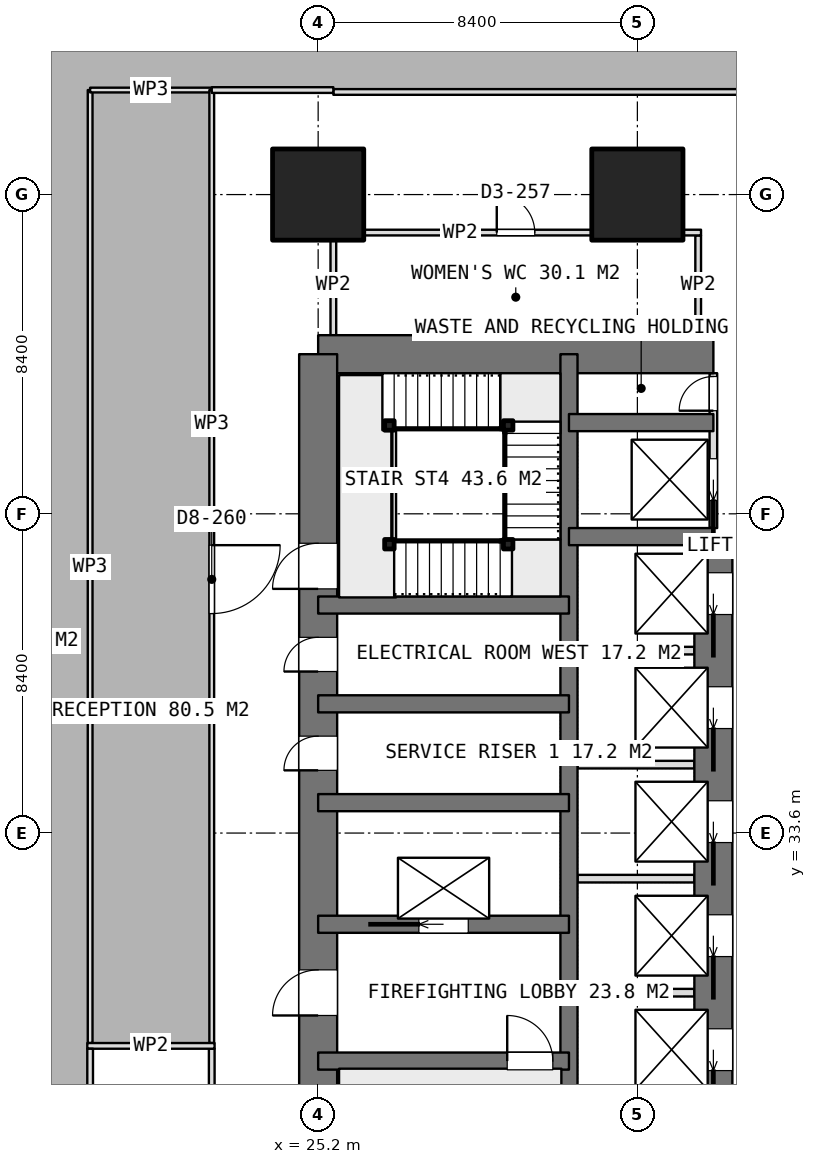
"""IFC4 building model, lengths in metres.
Left out: names, types, materials, properties, quantities, classifications, styles, units other than length and angle.
Written with IfcOpenShell. Run it as: python <this file> out.ifc"""

import sys

from ifc_helpers import new_model, si_unit, direction, frame, frame_2d, origin, origin_2d, place, context, subcontext, project, spatial, rectangle, extrude, element, fill, save


model = new_model("IFC4")
c1 = context("Model", 3, precision=1e-05, world=origin(), true_north=direction((0.0, 1.0)))
c2 = subcontext(c1, "Body", "Model", "MODEL_VIEW")
j1 = project(units=[si_unit("LENGTHUNIT", "METRE"), si_unit("PLANEANGLEUNIT", "RADIAN")], contexts=[c1])
p1 = place(None, origin())
s1 = spatial("IfcSite", under=j1, at=p1, CompositionType="ELEMENT")
p2 = place(p1, origin())
s2 = spatial("IfcBuilding", under=s1, at=p2, CompositionType="ELEMENT")
p3 = place(p2, frame((0.0, 0.0, 236.45)))
s3 = spatial("IfcBuildingStorey", under=s2, at=p3, CompositionType="ELEMENT", Elevation=236.45)
p4 = place(p3, frame((25.2, 46.2, 0.0), z_axis=(0.0, 0.0, 1.0), x_axis=(1.0, 0.0, 0.0)))
e1 = element("IfcWall", 1, at=p4, inside=s3, PredefinedType="SHEAR", context=c2, shape_type="SweptSolid", body=[
    extrude(rectangle(XDim=10.4, YDim=1.0, at=frame_2d((5.2, 0.0))), origin(), (0.0, 0.0, 1.0), 3.75),
])
p5 = place(p3, frame((25.2, 21.0, 0.0), z_axis=(0.0, 0.0, 1.0), x_axis=(0.0, 1.0, 0.0)))
e2 = element("IfcWall", 2, at=p5, inside=s3, PredefinedType="SHEAR", context=c2, shape_type="SweptSolid", body=[
    extrude(rectangle(XDim=25.2, YDim=1.0, at=frame_2d((12.6, 0.0))), origin(), (0.0, 0.0, 1.0), 3.75),
])
p6 = place(p5, frame((7.8, 0.0, 0.0)))
e3 = element("IfcOpeningElement", 3, at=p6, cuts=e2, PredefinedType="OPENING", context=c2, shape_type="SweptSolid", body=[
    extrude(rectangle(XDim=1.2, YDim=2.1, at=frame_2d((0.6, 1.05))), frame((0.0, 0.51, 0.0), z_axis=(0.0, -1.0, 0.0), x_axis=(1.0, 0.0, 0.0)), (0.0, 0.0, 1.0), 1.02),
])
p7 = place(p5, frame((14.25, 0.0, 0.0)))
e4 = element("IfcOpeningElement", 4, at=p7, cuts=e2, PredefinedType="OPENING", context=c2, shape_type="SweptSolid", body=[
    extrude(rectangle(XDim=0.9, YDim=2.1, at=frame_2d((0.45, 1.05))), frame((0.0, 0.51, 0.0), z_axis=(0.0, -1.0, 0.0), x_axis=(1.0, 0.0, 0.0)), (0.0, 0.0, 1.0), 1.02),
])
p8 = place(p5, frame((16.85, 0.0, 0.0)))
e5 = element("IfcOpeningElement", 5, at=p8, cuts=e2, PredefinedType="OPENING", context=c2, shape_type="SweptSolid", body=[
    extrude(rectangle(XDim=0.9, YDim=2.1, at=frame_2d((0.45, 1.05))), frame((0.0, 0.51, 0.0), z_axis=(0.0, -1.0, 0.0), x_axis=(1.0, 0.0, 0.0)), (0.0, 0.0, 1.0), 1.02),
])
p9 = place(p5, frame((19.025, 0.0, 0.0)))
e6 = element("IfcOpeningElement", 6, at=p9, cuts=e2, PredefinedType="OPENING", context=c2, shape_type="SweptSolid", body=[
    extrude(rectangle(XDim=1.2, YDim=2.1, at=frame_2d((0.6, 1.05))), frame((0.0, 0.51, 0.0), z_axis=(0.0, -1.0, 0.0), x_axis=(1.0, 0.0, 0.0)), (0.0, 0.0, 1.0), 1.02),
])
p10 = place(p3, frame((31.8, 21.0, 0.0), z_axis=(0.0, 0.0, 1.0), x_axis=(0.0, 1.0, 0.0)))
e7 = element("IfcWall", 7, at=p10, inside=s3, PredefinedType="SHEAR", context=c2, shape_type="SweptSolid", body=[
    extrude(rectangle(XDim=25.2, YDim=0.45, at=frame_2d((12.6, 0.0))), origin(), (0.0, 0.0, 1.0), 3.75),
])
p11 = place(p3, frame((35.6, 23.4, 0.0), z_axis=(0.0, 0.0, 1.0), x_axis=(0.0, 1.0, 0.0)))
e8 = element("IfcWall", 8, at=p11, inside=s3, PredefinedType="SHEAR", context=c2, shape_type="SweptSolid", body=[
    extrude(rectangle(XDim=18.0, YDim=1.0, at=frame_2d((9.0, 0.0))), origin(), (0.0, 0.0, 1.0), 3.75),
])
p12 = place(p11, frame((0.95, 0.0, 0.0)))
e9 = element("IfcOpeningElement", 9, at=p12, cuts=e8, PredefinedType="OPENING", context=c2, shape_type="SweptSolid", body=[
    extrude(rectangle(XDim=1.1, YDim=2.1, at=frame_2d((0.55, 1.05))), frame((0.0, 0.51, 0.0), z_axis=(0.0, -1.0, 0.0), x_axis=(1.0, 0.0, 0.0)), (0.0, 0.0, 1.0), 1.02),
])
p13 = place(p11, frame((3.95, 0.0, 0.0)))
e10 = element("IfcOpeningElement", 10, at=p13, cuts=e8, PredefinedType="OPENING", context=c2, shape_type="SweptSolid", body=[
    extrude(rectangle(XDim=1.1, YDim=2.1, at=frame_2d((0.55, 1.05))), frame((0.0, 0.51, 0.0), z_axis=(0.0, -1.0, 0.0), x_axis=(1.0, 0.0, 0.0)), (0.0, 0.0, 1.0), 1.02),
])
p14 = place(p11, frame((6.95, 0.0, 0.0)))
e11 = element("IfcOpeningElement", 11, at=p14, cuts=e8, PredefinedType="OPENING", context=c2, shape_type="SweptSolid", body=[
    extrude(rectangle(XDim=1.1, YDim=2.1, at=frame_2d((0.55, 1.05))), frame((0.0, 0.51, 0.0), z_axis=(0.0, -1.0, 0.0), x_axis=(1.0, 0.0, 0.0)), (0.0, 0.0, 1.0), 1.02),
])
p15 = place(p11, frame((9.95, 0.0, 0.0)))
e12 = element("IfcOpeningElement", 12, at=p15, cuts=e8, PredefinedType="OPENING", context=c2, shape_type="SweptSolid", body=[
    extrude(rectangle(XDim=1.1, YDim=2.1, at=frame_2d((0.55, 1.05))), frame((0.0, 0.51, 0.0), z_axis=(0.0, -1.0, 0.0), x_axis=(1.0, 0.0, 0.0)), (0.0, 0.0, 1.0), 1.02),
])
p16 = place(p11, frame((12.95, 0.0, 0.0)))
e13 = element("IfcOpeningElement", 13, at=p16, cuts=e8, PredefinedType="OPENING", context=c2, shape_type="SweptSolid", body=[
    extrude(rectangle(XDim=1.1, YDim=2.1, at=frame_2d((0.55, 1.05))), frame((0.0, 0.51, 0.0), z_axis=(0.0, -1.0, 0.0), x_axis=(1.0, 0.0, 0.0)), (0.0, 0.0, 1.0), 1.02),
])
p17 = place(p11, frame((15.95, 0.0, 0.0)))
e14 = element("IfcOpeningElement", 14, at=p17, cuts=e8, PredefinedType="OPENING", context=c2, shape_type="SweptSolid", body=[
    extrude(rectangle(XDim=1.1, YDim=2.1, at=frame_2d((0.55, 1.05))), frame((0.0, 0.51, 0.0), z_axis=(0.0, -1.0, 0.0), x_axis=(1.0, 0.0, 0.0)), (0.0, 0.0, 1.0), 1.02),
])
for number, where, z_axis, x_axis in (
    (15, (31.8, 41.4, 0.0), (0.0, 0.0, 1.0), (1.0, 0.0, 0.0)),
    (16, (31.8, 44.4, 0.0), (0.0, 0.0, 1.0), (1.0, 0.0, 0.0)),
):
    element("IfcWall", number, at=place(p3, frame(where, z_axis=z_axis, x_axis=x_axis)), inside=s3, PredefinedType="SHEAR", context=c2, shape_type="SweptSolid", body=[
        extrude(rectangle(XDim=3.8, YDim=0.45, at=frame_2d((1.9, 0.0))), origin(), (0.0, 0.0, 1.0), 3.75),
    ])
p18 = place(p3, frame((25.2, 27.6, 0.0), z_axis=(0.0, 0.0, 1.0), x_axis=(1.0, 0.0, 0.0)))
e17 = element("IfcWall", 17, at=p18, inside=s3, PredefinedType="SHEAR", context=c2, shape_type="SweptSolid", body=[
    extrude(rectangle(XDim=6.6, YDim=0.45, at=frame_2d((3.3, 0.0))), origin(), (0.0, 0.0, 1.0), 3.75),
])
p19 = place(p18, frame((4.975, 0.0, 0.0)))
e18 = element("IfcOpeningElement", 18, at=p19, cuts=e17, PredefinedType="OPENING", context=c2, shape_type="SweptSolid", body=[
    extrude(rectangle(XDim=1.2, YDim=2.1, at=frame_2d((0.6, 1.05))), frame((0.0, 0.235, 0.0), z_axis=(0.0, -1.0, 0.0), x_axis=(1.0, 0.0, 0.0)), (0.0, 0.0, 1.0), 0.47),
])
p20 = place(p3, frame((25.2, 31.2, 0.0), z_axis=(0.0, 0.0, 1.0), x_axis=(1.0, 0.0, 0.0)))
e19 = element("IfcWall", 19, at=p20, inside=s3, PredefinedType="SHEAR", context=c2, shape_type="SweptSolid", body=[
    extrude(rectangle(XDim=6.6, YDim=0.45, at=frame_2d((3.3, 0.0))), origin(), (0.0, 0.0, 1.0), 3.75),
])
p21 = place(p20, frame((2.65, 0.0, 0.0)))
e20 = element("IfcOpeningElement", 20, at=p21, cuts=e19, PredefinedType="OPENING", context=c2, shape_type="SweptSolid", body=[
    extrude(rectangle(XDim=1.3, YDim=2.1, at=frame_2d((0.65, 1.05))), frame((0.0, 0.235, 0.0), z_axis=(0.0, -1.0, 0.0), x_axis=(1.0, 0.0, 0.0)), (0.0, 0.0, 1.0), 0.47),
])
for number, where, z_axis, x_axis in (
    (21, (25.2, 34.4, 0.0), (0.0, 0.0, 1.0), (1.0, 0.0, 0.0)),
    (22, (25.2, 37.0, 0.0), (0.0, 0.0, 1.0), (1.0, 0.0, 0.0)),
    (23, (25.2, 39.6, 0.0), (0.0, 0.0, 1.0), (1.0, 0.0, 0.0)),
):
    element("IfcWall", number, at=place(p3, frame(where, z_axis=z_axis, x_axis=x_axis)), inside=s3, PredefinedType="SHEAR", context=c2, shape_type="SweptSolid", body=[
        extrude(rectangle(XDim=6.6, YDim=0.45, at=frame_2d((3.3, 0.0))), origin(), (0.0, 0.0, 1.0), 3.75),
    ])
for number, where, z_axis, x_axis in (
    (24, (25.2, 50.4, 0.0), (0.0, 0.0, 1.0), (1.0, 0.0, 0.0)),
    (25, (33.6, 50.4, 0.0), (0.0, 0.0, 1.0), (1.0, 0.0, 0.0)),
):
    element("IfcColumn", number, at=place(p3, frame(where, z_axis=z_axis, x_axis=x_axis)), inside=s3, PredefinedType="COLUMN", context=c2, shape_type="SweptSolid", body=[
        extrude(rectangle(XDim=2.4, YDim=2.4, at=origin_2d()), origin(), (0.0, 0.0, 1.0), 3.75),
    ])
for number, where, z_axis, x_axis in (
    (26, (32.025, 29.4, 0.0), (0.0, 0.0, 1.0), (1.0, 0.0, 0.0)),
    (27, (32.025, 32.4, 0.0), (0.0, 0.0, 1.0), (1.0, 0.0, 0.0)),
    (28, (32.025, 35.4, 0.0), (0.0, 0.0, 1.0), (1.0, 0.0, 0.0)),
    (29, (32.025, 38.4, 0.0), (0.0, 0.0, 1.0), (1.0, 0.0, 0.0)),
):
    element("IfcWall", number, at=place(p3, frame(where, z_axis=z_axis, x_axis=x_axis)), inside=s3, PredefinedType="PARTITIONING", context=c2, shape_type="SweptSolid", body=[
        extrude(rectangle(XDim=3.075, YDim=0.2, at=frame_2d((1.538, 0.0))), origin(), (0.0, 0.0, 1.0), 3.4),
    ])
p22 = place(p3, frame((35.6, 41.625, 0.0), z_axis=(0.0, 0.0, 1.0), x_axis=(0.0, 1.0, 0.0)))
e30 = element("IfcWall", 30, at=p22, inside=s3, PredefinedType="PARTITIONING", context=c2, shape_type="SweptSolid", body=[
    extrude(rectangle(XDim=4.075, YDim=0.2, at=frame_2d((2.038, 0.0))), origin(), (0.0, 0.0, 1.0), 3.4),
])
p23 = place(p22, frame((3.088, 0.0, 0.0)))
e31 = element("IfcOpeningElement", 31, at=p23, cuts=e30, PredefinedType="OPENING", context=c2, shape_type="SweptSolid", body=[
    extrude(rectangle(XDim=0.9, YDim=2.1, at=frame_2d((0.45, 1.05))), frame((0.0, 0.11, 0.0), z_axis=(0.0, -1.0, 0.0), x_axis=(1.0, 0.0, 0.0)), (0.0, 0.0, 1.0), 0.22),
])
p24 = place(p22, frame((0.725, 0.0, 0.0)))
e32 = element("IfcOpeningElement", 32, at=p24, cuts=e30, PredefinedType="OPENING", context=c2, shape_type="SweptSolid", body=[
    extrude(rectangle(XDim=1.1, YDim=2.1, at=frame_2d((0.55, 1.05))), frame((0.0, 0.11, 0.0), z_axis=(0.0, -1.0, 0.0), x_axis=(1.0, 0.0, 0.0)), (0.0, 0.0, 1.0), 0.22),
])
p25 = place(p3, frame((25.525, 49.4, 0.0), z_axis=(0.0, 0.0, 1.0), x_axis=(1.0, 0.0, 0.0)))
e33 = element("IfcWall", 33, at=p25, inside=s3, PredefinedType="PARTITIONING", context=c2, shape_type="SweptSolid", body=[
    extrude(rectangle(XDim=9.75, YDim=0.15, at=frame_2d((4.875, 0.0))), origin(), (0.0, 0.0, 1.0), 3.4),
])
p26 = place(p25, frame((4.375, 0.0, 0.0)))
e34 = element("IfcOpeningElement", 34, at=p26, cuts=e33, PredefinedType="OPENING", context=c2, shape_type="SweptSolid", body=[
    extrude(rectangle(XDim=1.0, YDim=2.1, at=frame_2d((0.5, 1.05))), frame((0.0, 0.085, 0.0), z_axis=(0.0, -1.0, 0.0), x_axis=(1.0, 0.0, 0.0)), (0.0, 0.0, 1.0), 0.17),
])
for number, where, z_axis, x_axis in (
    (35, (25.6, 46.7, 0.0), (0.0, 0.0, 1.0), (0.0, 1.0, 0.0)),
    (36, (35.2, 46.7, 0.0), (0.0, 0.0, 1.0), (0.0, 1.0, 0.0)),
):
    element("IfcWall", number, at=place(p3, frame(where, z_axis=z_axis, x_axis=x_axis)), inside=s3, PredefinedType="PARTITIONING", context=c2, shape_type="SweptSolid", body=[
        extrude(rectangle(XDim=2.625, YDim=0.15, at=frame_2d((1.312, 0.0))), origin(), (0.0, 0.0, 1.0), 3.4),
    ])
p27 = place(p3, frame((19.125, 28.0, 0.0), z_axis=(0.0, 0.0, 1.0), x_axis=(1.0, 0.0, 0.0)))
e37 = element("IfcWall", 37, at=p27, inside=s3, PredefinedType="PARTITIONING", context=c2, shape_type="SweptSolid", body=[
    extrude(rectangle(XDim=3.35, YDim=0.15, at=frame_2d((1.675, 0.0))), origin(), (0.0, 0.0, 1.0), 3.4),
])
p28 = place(p3, frame((19.2, 21.075, 0.0), z_axis=(0.0, 0.0, 1.0), x_axis=(0.0, 1.0, 0.0)))
e38 = element("IfcWall", 38, at=p28, inside=s3, PredefinedType="PARTITIONING", context=c2, shape_type="SweptSolid", body=[
    extrude(rectangle(XDim=6.85, YDim=0.15, at=frame_2d((3.425, 0.0))), origin(), (0.0, 0.0, 1.0), 3.4),
])
p29 = place(p3, frame((22.4, 21.075, 0.0), z_axis=(0.0, 0.0, 1.0), x_axis=(0.0, 1.0, 0.0)))
e39 = element("IfcWall", 39, at=p29, inside=s3, PredefinedType="PARTITIONING", context=c2, shape_type="SweptSolid", body=[
    extrude(rectangle(XDim=6.85, YDim=0.15, at=frame_2d((3.425, 0.0))), origin(), (0.0, 0.0, 1.0), 3.4),
])
p30 = place(p29, frame((1.325, 0.0, 0.0)))
e40 = element("IfcOpeningElement", 40, at=p30, cuts=e39, PredefinedType="OPENING", context=c2, shape_type="SweptSolid", body=[
    extrude(rectangle(XDim=1.0, YDim=2.1, at=frame_2d((0.5, 1.05))), frame((0.0, 0.085, 0.0), z_axis=(0.0, -1.0, 0.0), x_axis=(1.0, 0.0, 0.0)), (0.0, 0.0, 1.0), 0.17),
])
p31 = place(p3, frame((19.2, 28.075, 0.0), z_axis=(0.0, 0.0, 1.0), x_axis=(0.0, 1.0, 0.0)))
e41 = element("IfcWall", 41, at=p31, inside=s3, PredefinedType="PARTITIONING", context=c2, shape_type="SweptSolid", body=[
    extrude(rectangle(XDim=25.075, YDim=0.125, at=frame_2d((12.538, 0.0))), origin(), (0.0, 0.0, 1.0), 3.4),
])
p32 = place(p3, frame((19.2, 53.15, 0.0), z_axis=(0.0, 0.0, 1.0), x_axis=(1.0, 0.0, 0.0)))
e42 = element("IfcWall", 42, at=p32, inside=s3, PredefinedType="PARTITIONING", context=c2, shape_type="SweptSolid", body=[
    extrude(rectangle(XDim=3.2, YDim=0.125, at=frame_2d((1.6, 0.0))), origin(), (0.0, 0.0, 1.0), 3.4),
])
p33 = place(p3, frame((22.4, 53.15, 0.0), z_axis=(0.0, 0.0, 1.0), x_axis=(0.0, -1.0, 0.0)))
e43 = element("IfcWall", 43, at=p33, inside=s3, PredefinedType="PARTITIONING", context=c2, shape_type="SweptSolid", body=[
    extrude(rectangle(XDim=25.075, YDim=0.125, at=frame_2d((12.538, 0.0))), origin(), (0.0, 0.0, 1.0), 3.4),
])
p34 = place(p33, frame((11.975, 0.0, 0.0)))
e44 = element("IfcOpeningElement", 44, at=p34, cuts=e43, PredefinedType="OPENING", context=c2, shape_type="SweptSolid", body=[
    extrude(rectangle(XDim=1.8, YDim=2.1, at=frame_2d((0.9, 1.05))), frame((0.0, 0.073, 0.0), z_axis=(0.0, -1.0, 0.0), x_axis=(1.0, 0.0, 0.0)), (0.0, 0.0, 1.0), 0.145),
])
p35 = place(p3, frame((53.2, 53.1, 0.0), z_axis=(0.0, 0.0, 1.0), x_axis=(-1.0, 0.0, 0.0)))
e45 = element("IfcWall", 45, at=p35, inside=s3, PredefinedType="PARTITIONING", context=c2, shape_type="SweptSolid", body=[
    extrude(rectangle(XDim=27.6, YDim=0.15, at=frame_2d((13.8, 0.0))), origin(), (0.0, 0.0, 1.0), 3.4),
])
p36 = place(p35, frame((13.3, 0.0, 0.0)))
e46 = element("IfcOpeningElement", 46, at=p36, cuts=e45, PredefinedType="OPENING", context=c2, shape_type="SweptSolid", body=[
    extrude(rectangle(XDim=1.0, YDim=2.1, at=frame_2d((0.5, 1.05))), frame((0.0, 0.085, 0.0), z_axis=(0.0, -1.0, 0.0), x_axis=(1.0, 0.0, 0.0)), (0.0, 0.0, 1.0), 0.17),
])
p37 = place(p3, frame((25.6, 53.15, 0.0), z_axis=(0.0, 0.0, 1.0), x_axis=(-1.0, 0.0, 0.0)))
e47 = element("IfcWall", 47, at=p37, inside=s3, PredefinedType="PARTITIONING", context=c2, shape_type="SweptSolid", body=[
    extrude(rectangle(XDim=3.2, YDim=0.15, at=frame_2d((1.6, 0.0))), origin(), (0.0, 0.0, 1.0), 3.4),
])
for number, where, z_axis, x_axis in (
    (48, (27.075, 41.2, 0.0), (0.0, 0.0, 1.0), (1.0, 0.0, 0.0)),
    (49, (30.2, 41.2, 0.0), (0.0, 0.0, 1.0), (1.0, 0.0, 0.0)),
    (50, (30.2, 44.325, 0.0), (0.0, 0.0, 1.0), (1.0, 0.0, 0.0)),
    (51, (27.075, 44.325, 0.0), (0.0, 0.0, 1.0), (1.0, 0.0, 0.0)),
):
    element("IfcColumn", number, at=place(p3, frame(where, z_axis=z_axis, x_axis=x_axis)), inside=s3, PredefinedType="COLUMN", context=c2, shape_type="SweptSolid", body=[
        extrude(rectangle(XDim=0.25, YDim=0.25, at=origin_2d()), origin(), (0.0, 0.0, 1.0), 3.75),
    ])
p38 = place(p6, origin())
e52 = element("IfcDoor", 52, at=p38, inside=s3, OperationType="SINGLE_SWING_LEFT", PredefinedType="DOOR", context=c2, shape_type="SweptSolid", body=[
    extrude(rectangle(XDim=1.2, YDim=2.1, at=frame_2d((0.6, 1.05))), frame((0.0, 0.025, 0.0), z_axis=(0.0, -1.0, 0.0), x_axis=(1.0, 0.0, 0.0)), (0.0, 0.0, 1.0), 0.05),
])
fill(e3, e52)
p39 = place(p7, origin())
e53 = element("IfcDoor", 53, at=p39, inside=s3, OperationType="SINGLE_SWING_LEFT", PredefinedType="DOOR", context=c2, shape_type="SweptSolid", body=[
    extrude(rectangle(XDim=0.9, YDim=2.1, at=frame_2d((0.45, 1.05))), frame((0.0, 0.025, 0.0), z_axis=(0.0, -1.0, 0.0), x_axis=(1.0, 0.0, 0.0)), (0.0, 0.0, 1.0), 0.05),
])
fill(e4, e53)
p40 = place(p8, origin())
e54 = element("IfcDoor", 54, at=p40, inside=s3, OperationType="SINGLE_SWING_LEFT", PredefinedType="DOOR", context=c2, shape_type="SweptSolid", body=[
    extrude(rectangle(XDim=0.9, YDim=2.1, at=frame_2d((0.45, 1.05))), frame((0.0, 0.025, 0.0), z_axis=(0.0, -1.0, 0.0), x_axis=(1.0, 0.0, 0.0)), (0.0, 0.0, 1.0), 0.05),
])
fill(e5, e54)
p41 = place(p23, origin())
e55 = element("IfcDoor", 55, at=p41, inside=s3, OperationType="SINGLE_SWING_LEFT", PredefinedType="DOOR", context=c2, shape_type="SweptSolid", body=[
    extrude(rectangle(XDim=0.9, YDim=2.1, at=frame_2d((0.45, 1.05))), frame((0.0, 0.025, 0.0), z_axis=(0.0, -1.0, 0.0), x_axis=(1.0, 0.0, 0.0)), (0.0, 0.0, 1.0), 0.05),
])
fill(e31, e55)
p42 = place(p13, origin())
e56 = element("IfcDoor", 56, at=p42, inside=s3, OperationType="SLIDING_TO_LEFT", PredefinedType="USERDEFINED", context=c2, shape_type="SweptSolid", body=[
    extrude(rectangle(XDim=1.1, YDim=2.1, at=frame_2d((0.55, 1.05))), frame((0.0, 0.025, 0.0), z_axis=(0.0, -1.0, 0.0), x_axis=(1.0, 0.0, 0.0)), (0.0, 0.0, 1.0), 0.05),
])
fill(e10, e56)
p43 = place(p14, origin())
e57 = element("IfcDoor", 57, at=p43, inside=s3, OperationType="SLIDING_TO_LEFT", PredefinedType="USERDEFINED", context=c2, shape_type="SweptSolid", body=[
    extrude(rectangle(XDim=1.1, YDim=2.1, at=frame_2d((0.55, 1.05))), frame((0.0, 0.025, 0.0), z_axis=(0.0, -1.0, 0.0), x_axis=(1.0, 0.0, 0.0)), (0.0, 0.0, 1.0), 0.05),
])
fill(e11, e57)
p44 = place(p15, origin())
e58 = element("IfcDoor", 58, at=p44, inside=s3, OperationType="SLIDING_TO_LEFT", PredefinedType="USERDEFINED", context=c2, shape_type="SweptSolid", body=[
    extrude(rectangle(XDim=1.1, YDim=2.1, at=frame_2d((0.55, 1.05))), frame((0.0, 0.025, 0.0), z_axis=(0.0, -1.0, 0.0), x_axis=(1.0, 0.0, 0.0)), (0.0, 0.0, 1.0), 0.05),
])
fill(e12, e58)
p45 = place(p16, origin())
e59 = element("IfcDoor", 59, at=p45, inside=s3, OperationType="SLIDING_TO_LEFT", PredefinedType="USERDEFINED", context=c2, shape_type="SweptSolid", body=[
    extrude(rectangle(XDim=1.1, YDim=2.1, at=frame_2d((0.55, 1.05))), frame((0.0, 0.025, 0.0), z_axis=(0.0, -1.0, 0.0), x_axis=(1.0, 0.0, 0.0)), (0.0, 0.0, 1.0), 0.05),
])
fill(e13, e59)
p46 = place(p17, origin())
e60 = element("IfcDoor", 60, at=p46, inside=s3, OperationType="SLIDING_TO_LEFT", PredefinedType="USERDEFINED", context=c2, shape_type="SweptSolid", body=[
    extrude(rectangle(XDim=1.1, YDim=2.1, at=frame_2d((0.55, 1.05))), frame((0.0, 0.025, 0.0), z_axis=(0.0, -1.0, 0.0), x_axis=(1.0, 0.0, 0.0)), (0.0, 0.0, 1.0), 0.05),
])
fill(e14, e60)
p47 = place(p21, origin())
e61 = element("IfcDoor", 61, at=p47, inside=s3, OperationType="SLIDING_TO_LEFT", PredefinedType="USERDEFINED", context=c2, shape_type="SweptSolid", body=[
    extrude(rectangle(XDim=1.3, YDim=2.1, at=frame_2d((0.65, 1.05))), frame((0.0, 0.025, 0.0), z_axis=(0.0, -1.0, 0.0), x_axis=(1.0, 0.0, 0.0)), (0.0, 0.0, 1.0), 0.05),
])
fill(e20, e61)
p48 = place(p24, origin())
e62 = element("IfcDoor", 62, at=p48, inside=s3, OperationType="SLIDING_TO_LEFT", PredefinedType="USERDEFINED", context=c2, shape_type="SweptSolid", body=[
    extrude(rectangle(XDim=1.1, YDim=2.1, at=frame_2d((0.55, 1.05))), frame((0.0, 0.025, 0.0), z_axis=(0.0, -1.0, 0.0), x_axis=(1.0, 0.0, 0.0)), (0.0, 0.0, 1.0), 0.05),
])
fill(e32, e62)
p49 = place(p26, origin())
e63 = element("IfcDoor", 63, at=p49, inside=s3, OperationType="SINGLE_SWING_LEFT", PredefinedType="DOOR", context=c2, shape_type="SweptSolid", body=[
    extrude(rectangle(XDim=1.0, YDim=2.1, at=frame_2d((0.5, 1.05))), frame((0.0, 0.025, 0.0), z_axis=(0.0, -1.0, 0.0), x_axis=(1.0, 0.0, 0.0)), (0.0, 0.0, 1.0), 0.05),
])
fill(e34, e63)
p50 = place(p34, origin())
e64 = element("IfcDoor", 64, at=p50, inside=s3, OperationType="DOUBLE_DOOR_SINGLE_SWING", PredefinedType="DOOR", context=c2, shape_type="SweptSolid", body=[
    extrude(rectangle(XDim=1.8, YDim=2.1, at=frame_2d((0.9, 1.05))), frame((0.0, 0.025, 0.0), z_axis=(0.0, -1.0, 0.0), x_axis=(1.0, 0.0, 0.0)), (0.0, 0.0, 1.0), 0.05),
])
fill(e44, e64)
p51 = place(p19, origin())
e65 = element("IfcDoor", 65, at=p51, inside=s3, OperationType="SINGLE_SWING_RIGHT", PredefinedType="DOOR", context=c2, shape_type="SweptSolid", body=[
    extrude(rectangle(XDim=1.2, YDim=2.1, at=frame_2d((0.6, 1.05))), frame((0.0, 0.025, 0.0), z_axis=(0.0, -1.0, 0.0), x_axis=(1.0, 0.0, 0.0)), (0.0, 0.0, 1.0), 0.05),
])
fill(e18, e65)
p52 = place(p9, origin())
e66 = element("IfcDoor", 66, at=p52, inside=s3, OperationType="SINGLE_SWING_RIGHT", PredefinedType="DOOR", context=c2, shape_type="SweptSolid", body=[
    extrude(rectangle(XDim=1.2, YDim=2.1, at=frame_2d((0.6, 1.05))), frame((0.0, 0.025, 0.0), z_axis=(0.0, -1.0, 0.0), x_axis=(1.0, 0.0, 0.0)), (0.0, 0.0, 1.0), 0.05),
])
fill(e6, e66)
save(model, sys.argv[1])
